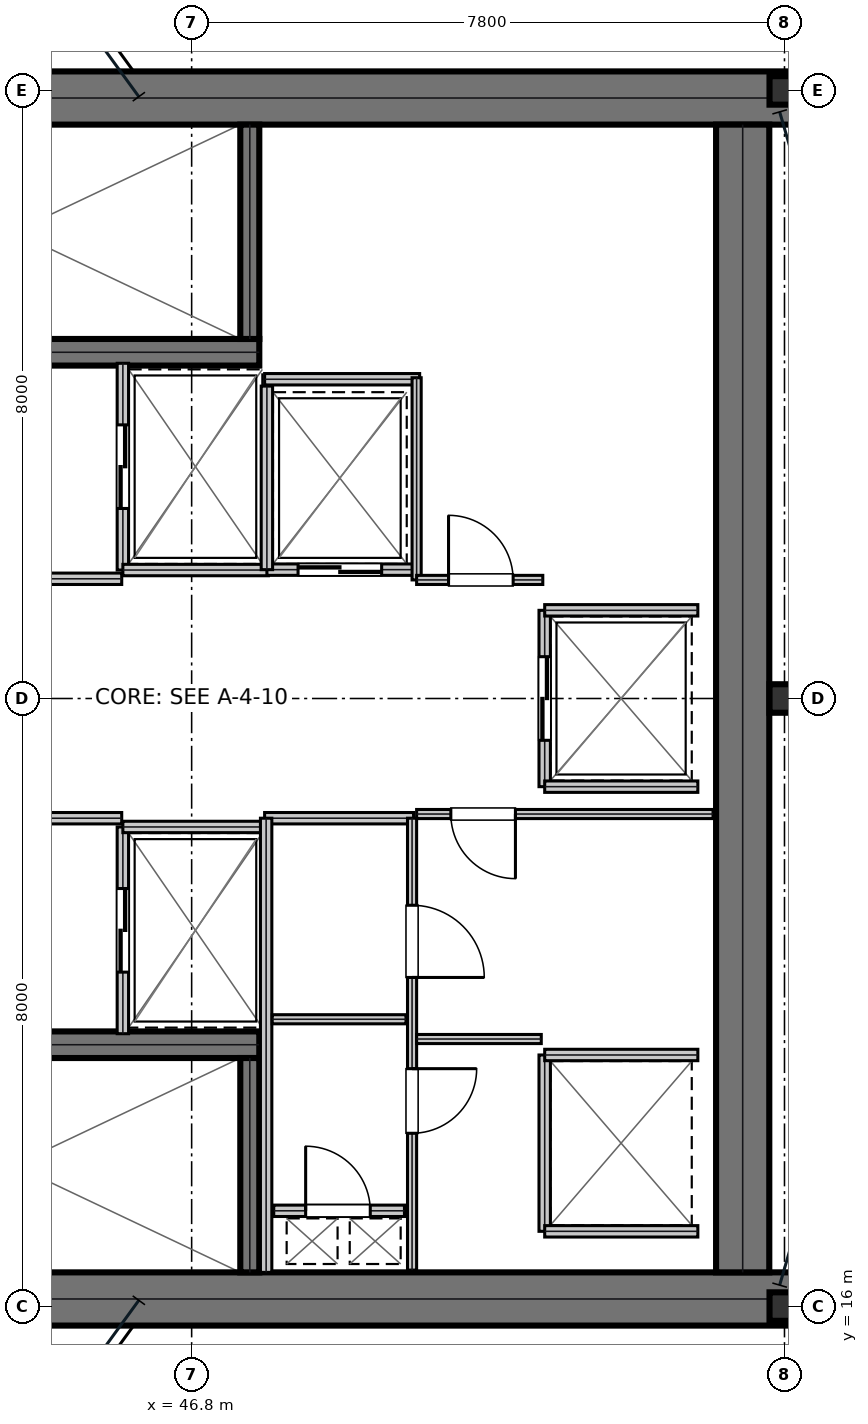
"""IFC4 building model, lengths in metres.
Left out: names, types, materials, properties, quantities, classifications, styles, units other than length and angle.
Written with IfcOpenShell. Run it as: python <this file> out.ifc"""

import sys

from ifc_helpers import new_model, si_unit, direction, frame, frame_2d, origin, origin_2d, place, context, subcontext, project, spatial, rectangle, i_section, extrude, element, fill, save


model = new_model("IFC4")
c1 = context("Model", 3, precision=1e-05, world=origin(), true_north=direction((0.0, 1.0)))
c2 = subcontext(c1, "Body", "Model", "MODEL_VIEW")
j1 = project(units=[si_unit("LENGTHUNIT", "METRE"), si_unit("PLANEANGLEUNIT", "RADIAN")], contexts=[c1])
p1 = place(None, origin())
s1 = spatial("IfcSite", under=j1, at=p1, CompositionType="ELEMENT")
p2 = place(p1, origin())
s2 = spatial("IfcBuilding", under=s1, at=p2, CompositionType="ELEMENT")
p3 = place(p2, frame((0.0, 0.0, 228.3)))
s3 = spatial("IfcBuildingStorey", under=s2, at=p3, CompositionType="ELEMENT", Elevation=228.3)
for number, where, z_axis, x_axis in (
    (1, (38.8, 31.9, 0.0), (0.0, 0.0, 1.0), (1.0, 0.0, 0.0)),
    (2, (38.8, 16.1, 0.0), (0.0, 0.0, 1.0), (1.0, 0.0, 0.0)),
):
    element("IfcWall", number, at=place(p3, frame(where, z_axis=z_axis, x_axis=x_axis)), inside=s3, PredefinedType="SHEAR", context=c2, shape_type="SweptSolid", body=[
        extrude(rectangle(XDim=16.0, YDim=0.7, at=frame_2d((8.0, 0.0))), origin(), (0.0, 0.0, 1.0), 3.79),
    ])
p4 = place(p3, frame((54.05, 16.45, 0.0), z_axis=(0.0, 0.0, 1.0), x_axis=(0.0, 1.0, 0.0)))
e3 = element("IfcWall", 3, at=p4, inside=s3, PredefinedType="SHEAR", context=c2, shape_type="SweptSolid", body=[
    extrude(rectangle(XDim=15.1, YDim=0.7, at=frame_2d((7.55, 0.0))), origin(), (0.0, 0.0, 1.0), 3.79),
])
p5 = place(p3, frame((39.98, 28.555, 0.0), z_axis=(0.0, 0.0, 1.0), x_axis=(1.0, 0.0, 0.0)))
e4 = element("IfcWall", 4, at=p5, inside=s3, PredefinedType="SHEAR", context=c2, shape_type="SweptSolid", body=[
    extrude(rectangle(XDim=7.71, YDim=0.35, at=frame_2d((3.855, 0.0))), origin(), (0.0, 0.0, 1.0), 3.79),
])
p6 = place(p5, frame((0.25, 0.0, 0.0)))
e5 = element("IfcOpeningElement", 5, at=p6, cuts=e4, PredefinedType="OPENING", context=c2, shape_type="SweptSolid", body=[
    extrude(rectangle(XDim=1.1, YDim=2.15, at=frame_2d((0.55, 1.075))), frame((0.0, 0.185, 0.0), z_axis=(0.0, -1.0, 0.0), x_axis=(1.0, 0.0, 0.0)), (0.0, 0.0, 1.0), 0.37),
])
p7 = place(p3, frame((39.98, 19.445, 0.0), z_axis=(0.0, 0.0, 1.0), x_axis=(1.0, 0.0, 0.0)))
e6 = element("IfcWall", 6, at=p7, inside=s3, PredefinedType="SHEAR", context=c2, shape_type="SweptSolid", body=[
    extrude(rectangle(XDim=7.71, YDim=0.35, at=frame_2d((3.855, 0.0))), origin(), (0.0, 0.0, 1.0), 3.79),
])
p8 = place(p7, frame((0.25, 0.0, 0.0)))
e7 = element("IfcOpeningElement", 7, at=p8, cuts=e6, PredefinedType="OPENING", context=c2, shape_type="SweptSolid", body=[
    extrude(rectangle(XDim=1.1, YDim=2.15, at=frame_2d((0.55, 1.075))), frame((0.0, 0.185, 0.0), z_axis=(0.0, -1.0, 0.0), x_axis=(1.0, 0.0, 0.0)), (0.0, 0.0, 1.0), 0.37),
])
for number, where, z_axis, x_axis in (
    (8, (47.565, 28.73, 0.0), (0.0, 0.0, 1.0), (0.0, 1.0, 0.0)),
    (9, (47.565, 16.45, 0.0), (0.0, 0.0, 1.0), (0.0, 1.0, 0.0)),
):
    element("IfcWall", number, at=place(p3, frame(where, z_axis=z_axis, x_axis=x_axis)), inside=s3, PredefinedType="SHEAR", context=c2, shape_type="SweptSolid", body=[
        extrude(rectangle(XDim=2.82, YDim=0.25, at=frame_2d((1.41, 0.0))), origin(), (0.0, 0.0, 1.0), 3.79),
    ])
for number, where, z_axis, x_axis in (
    (10, (54.6, 16.0, 0.0), (0.0, 0.0, 1.0), (1.0, 0.0, 0.0)),
    (11, (54.6, 24.0, 0.0), (0.0, 0.0, 1.0), (1.0, 0.0, 0.0)),
    (12, (54.6, 32.0, 0.0), (0.0, 0.0, 1.0), (1.0, 0.0, 0.0)),
):
    element("IfcColumn", number, at=place(p3, frame(where, z_axis=z_axis, x_axis=x_axis)), inside=s3, PredefinedType="COLUMN", context=c2, shape_type="SweptSolid", body=[
        extrude(i_section(OverallWidth=0.394, OverallDepth=0.375, WebThickness=0.017, FlangeThickness=0.028, at=origin_2d()), origin(), (0.0, 0.0, 1.0), 4.044),
    ])
p9 = place(p3, frame((39.98, 25.575, 0.0), z_axis=(0.0, 0.0, 1.0), x_axis=(1.0, 0.0, 0.0)))
e13 = element("IfcWall", 13, at=p9, inside=s3, PredefinedType="PARTITIONING", context=c2, shape_type="SweptSolid", body=[
    extrude(rectangle(XDim=5.9, YDim=0.15, at=frame_2d((2.95, 0.0))), origin(), (0.0, 0.0, 1.0), 3.79),
])
p10 = place(p9, frame((2.35, 0.0, 0.0)))
e14 = element("IfcOpeningElement", 14, at=p10, cuts=e13, PredefinedType="OPENING", context=c2, shape_type="SweptSolid", body=[
    extrude(rectangle(XDim=1.05, YDim=2.15, at=frame_2d((0.525, 1.075))), frame((0.0, 0.085, 0.0), z_axis=(0.0, -1.0, 0.0), x_axis=(1.0, 0.0, 0.0)), (0.0, 0.0, 1.0), 0.17),
])
p11 = place(p3, frame((39.98, 22.425, 0.0), z_axis=(0.0, 0.0, 1.0), x_axis=(1.0, 0.0, 0.0)))
e15 = element("IfcWall", 15, at=p11, inside=s3, PredefinedType="PARTITIONING", context=c2, shape_type="SweptSolid", body=[
    extrude(rectangle(XDim=5.9, YDim=0.15, at=frame_2d((2.95, 0.0))), origin(), (0.0, 0.0, 1.0), 3.79),
])
p12 = place(p11, frame((2.35, 0.0, 0.0)))
e16 = element("IfcOpeningElement", 16, at=p12, cuts=e15, PredefinedType="OPENING", context=c2, shape_type="SweptSolid", body=[
    extrude(rectangle(XDim=1.05, YDim=2.15, at=frame_2d((0.525, 1.075))), frame((0.0, 0.085, 0.0), z_axis=(0.0, -1.0, 0.0), x_axis=(1.0, 0.0, 0.0)), (0.0, 0.0, 1.0), 0.17),
])
p13 = place(p3, frame((45.895, 25.69, 0.0), z_axis=(0.0, 0.0, 1.0), x_axis=(0.0, 1.0, 0.0)))
e17 = element("IfcWall", 17, at=p13, inside=s3, PredefinedType="PARTITIONING", context=c2, shape_type="SweptSolid", body=[
    extrude(rectangle(XDim=2.72, YDim=0.15, at=frame_2d((1.36, 0.0))), origin(), (0.0, 0.0, 1.0), 3.79),
])
p14 = place(p13, frame((0.81, 0.0, 0.0)))
e18 = element("IfcOpeningElement", 18, at=p14, cuts=e17, PredefinedType="OPENING", context=c2, shape_type="SweptSolid", body=[
    extrude(rectangle(XDim=1.1, YDim=2.15, at=frame_2d((0.55, 1.075))), frame((0.0, 0.085, 0.0), z_axis=(0.0, -1.0, 0.0), x_axis=(1.0, 0.0, 0.0)), (0.0, 0.0, 1.0), 0.17),
])
p15 = place(p3, frame((45.895, 25.69, 0.0), z_axis=(0.0, 0.0, 1.0), x_axis=(1.0, 0.0, 0.0)))
e19 = element("IfcWall", 19, at=p15, inside=s3, PredefinedType="PARTITIONING", context=c2, shape_type="SweptSolid", body=[
    extrude(rectangle(XDim=1.915, YDim=0.15, at=frame_2d((0.958, 0.0))), origin(), (0.0, 0.0, 1.0), 3.79),
])
p16 = place(p3, frame((45.895, 19.59, 0.0), z_axis=(0.0, 0.0, 1.0), x_axis=(0.0, 1.0, 0.0)))
e20 = element("IfcWall", 20, at=p16, inside=s3, PredefinedType="PARTITIONING", context=c2, shape_type="SweptSolid", body=[
    extrude(rectangle(XDim=2.72, YDim=0.15, at=frame_2d((1.36, 0.0))), origin(), (0.0, 0.0, 1.0), 3.79),
])
p17 = place(p16, frame((0.81, 0.0, 0.0)))
e21 = element("IfcOpeningElement", 21, at=p17, cuts=e20, PredefinedType="OPENING", context=c2, shape_type="SweptSolid", body=[
    extrude(rectangle(XDim=1.1, YDim=2.15, at=frame_2d((0.55, 1.075))), frame((0.0, 0.085, 0.0), z_axis=(0.0, -1.0, 0.0), x_axis=(1.0, 0.0, 0.0)), (0.0, 0.0, 1.0), 0.17),
])
p18 = place(p3, frame((45.895, 22.31, 0.0), z_axis=(0.0, 0.0, 1.0), x_axis=(1.0, 0.0, 0.0)))
e22 = element("IfcWall", 22, at=p18, inside=s3, PredefinedType="PARTITIONING", context=c2, shape_type="SweptSolid", body=[
    extrude(rectangle(XDim=1.915, YDim=0.15, at=frame_2d((0.958, 0.0))), origin(), (0.0, 0.0, 1.0), 3.79),
])
p19 = place(p3, frame((47.79, 25.695, 0.0), z_axis=(0.0, 0.0, 1.0), x_axis=(1.0, 0.0, 0.0)))
e23 = element("IfcWall", 23, at=p19, inside=s3, PredefinedType="PARTITIONING", context=c2, shape_type="SweptSolid", body=[
    extrude(rectangle(XDim=1.92, YDim=0.15, at=frame_2d((0.96, 0.0))), origin(), (0.0, 0.0, 1.0), 3.79),
])
p20 = place(p19, frame((0.41, 0.0, 0.0)))
e24 = element("IfcOpeningElement", 24, at=p20, cuts=e23, PredefinedType="OPENING", context=c2, shape_type="SweptSolid", body=[
    extrude(rectangle(XDim=1.1, YDim=2.15, at=frame_2d((0.55, 1.075))), frame((0.0, 0.085, 0.0), z_axis=(0.0, -1.0, 0.0), x_axis=(1.0, 0.0, 0.0)), (0.0, 0.0, 1.0), 0.17),
])
p21 = place(p3, frame((47.79, 25.695, 0.0), z_axis=(0.0, 0.0, 1.0), x_axis=(0.0, 1.0, 0.0)))
e25 = element("IfcWall", 25, at=p21, inside=s3, PredefinedType="PARTITIONING", context=c2, shape_type="SweptSolid", body=[
    extrude(rectangle(XDim=2.415, YDim=0.15, at=frame_2d((1.208, 0.0))), origin(), (0.0, 0.0, 1.0), 3.79),
])
p22 = place(p3, frame((51.445, 22.84, 0.0), z_axis=(0.0, 0.0, 1.0), x_axis=(0.0, 1.0, 0.0)))
e26 = element("IfcWall", 26, at=p22, inside=s3, PredefinedType="PARTITIONING", context=c2, shape_type="SweptSolid", body=[
    extrude(rectangle(XDim=2.32, YDim=0.15, at=frame_2d((1.16, 0.0))), origin(), (0.0, 0.0, 1.0), 3.79),
])
p23 = place(p22, frame((0.61, 0.0, 0.0)))
e27 = element("IfcOpeningElement", 27, at=p23, cuts=e26, PredefinedType="OPENING", context=c2, shape_type="SweptSolid", body=[
    extrude(rectangle(XDim=1.1, YDim=2.15, at=frame_2d((0.55, 1.075))), frame((0.0, 0.085, 0.0), z_axis=(0.0, -1.0, 0.0), x_axis=(1.0, 0.0, 0.0)), (0.0, 0.0, 1.0), 0.17),
])
for number, where, z_axis, x_axis in (
    (28, (51.445, 22.84, 0.0), (0.0, 0.0, 1.0), (1.0, 0.0, 0.0)),
    (29, (51.445, 25.16, 0.0), (0.0, 0.0, 1.0), (1.0, 0.0, 0.0)),
):
    element("IfcWall", number, at=place(p3, frame(where, z_axis=z_axis, x_axis=x_axis)), inside=s3, PredefinedType="PARTITIONING", context=c2, shape_type="SweptSolid", body=[
        extrude(rectangle(XDim=2.015, YDim=0.15, at=frame_2d((1.007, 0.0))), origin(), (0.0, 0.0, 1.0), 3.79),
    ])
p24 = place(p3, frame((51.445, 16.99, 0.0), z_axis=(0.0, 0.0, 1.0), x_axis=(0.0, 1.0, 0.0)))
e30 = element("IfcWall", 30, at=p24, inside=s3, PredefinedType="PARTITIONING", context=c2, shape_type="SweptSolid", body=[
    extrude(rectangle(XDim=2.32, YDim=0.15, at=frame_2d((1.16, 0.0))), origin(), (0.0, 0.0, 1.0), 3.79),
])
for number, where, z_axis, x_axis in (
    (31, (51.445, 16.99, 0.0), (0.0, 0.0, 1.0), (1.0, 0.0, 0.0)),
    (32, (51.445, 19.31, 0.0), (0.0, 0.0, 1.0), (1.0, 0.0, 0.0)),
):
    element("IfcWall", number, at=place(p3, frame(where, z_axis=z_axis, x_axis=x_axis)), inside=s3, PredefinedType="PARTITIONING", context=c2, shape_type="SweptSolid", body=[
        extrude(rectangle(XDim=2.015, YDim=0.15, at=frame_2d((1.007, 0.0))), origin(), (0.0, 0.0, 1.0), 3.79),
    ])
p25 = place(p3, frame((47.88, 17.26, 0.0), z_axis=(0.0, 0.0, 1.0), x_axis=(1.0, 0.0, 0.0)))
e33 = element("IfcWall", 33, at=p25, inside=s3, PredefinedType="PARTITIONING", context=c2, shape_type="SweptSolid", body=[
    extrude(rectangle(XDim=1.72, YDim=0.15, at=frame_2d((0.86, 0.0))), origin(), (0.0, 0.0, 1.0), 3.79),
])
p26 = place(p25, frame((0.42, 0.0, 0.0)))
e34 = element("IfcOpeningElement", 34, at=p26, cuts=e33, PredefinedType="OPENING", context=c2, shape_type="SweptSolid", body=[
    extrude(rectangle(XDim=0.85, YDim=2.15, at=frame_2d((0.425, 1.075))), frame((0.0, 0.085, 0.0), z_axis=(0.0, -1.0, 0.0), x_axis=(1.0, 0.0, 0.0)), (0.0, 0.0, 1.0), 0.17),
])
p27 = place(p3, frame((47.76, 22.425, 0.0), z_axis=(0.0, 0.0, 1.0), x_axis=(1.0, 0.0, 0.0)))
e35 = element("IfcWall", 35, at=p27, inside=s3, PredefinedType="PARTITIONING", context=c2, shape_type="SweptSolid", body=[
    extrude(rectangle(XDim=1.96, YDim=0.15, at=frame_2d((0.98, 0.0))), origin(), (0.0, 0.0, 1.0), 3.79),
])
p28 = place(p3, frame((47.78, 16.45, 0.0), z_axis=(0.0, 0.0, 1.0), x_axis=(0.0, 1.0, 0.0)))
e36 = element("IfcWall", 36, at=p28, inside=s3, PredefinedType="PARTITIONING", context=c2, shape_type="SweptSolid", body=[
    extrude(rectangle(XDim=5.975, YDim=0.15, at=frame_2d((2.988, 0.0))), origin(), (0.0, 0.0, 1.0), 3.79),
])
p29 = place(p3, frame((47.86, 19.78, 0.0), z_axis=(0.0, 0.0, 1.0), x_axis=(1.0, 0.0, 0.0)))
e37 = element("IfcWall", 37, at=p29, inside=s3, PredefinedType="PARTITIONING", context=c2, shape_type="SweptSolid", body=[
    extrude(rectangle(XDim=1.76, YDim=0.12, at=frame_2d((0.88, 0.0))), origin(), (0.0, 0.0, 1.0), 3.79),
])
p30 = place(p3, frame((49.7, 16.48, 0.0), z_axis=(0.0, 0.0, 1.0), x_axis=(0.0, 1.0, 0.0)))
e38 = element("IfcWall", 38, at=p30, inside=s3, PredefinedType="PARTITIONING", context=c2, shape_type="SweptSolid", body=[
    extrude(rectangle(XDim=5.945, YDim=0.12, at=frame_2d((2.973, 0.0))), origin(), (0.0, 0.0, 1.0), 3.79),
])
p31 = place(p30, frame((1.8, 0.0, 0.0)))
e39 = element("IfcOpeningElement", 39, at=p31, cuts=e38, PredefinedType="OPENING", context=c2, shape_type="SweptSolid", body=[
    extrude(rectangle(XDim=0.85, YDim=2.15, at=frame_2d((0.425, 1.075))), frame((0.0, 0.07, 0.0), z_axis=(0.0, -1.0, 0.0), x_axis=(1.0, 0.0, 0.0)), (0.0, 0.0, 1.0), 0.14),
])
p32 = place(p30, frame((3.85, 0.0, 0.0)))
e40 = element("IfcOpeningElement", 40, at=p32, cuts=e38, PredefinedType="OPENING", context=c2, shape_type="SweptSolid", body=[
    extrude(rectangle(XDim=0.95, YDim=2.15, at=frame_2d((0.475, 1.075))), frame((0.0, 0.07, 0.0), z_axis=(0.0, -1.0, 0.0), x_axis=(1.0, 0.0, 0.0)), (0.0, 0.0, 1.0), 0.14),
])
p33 = place(p3, frame((49.76, 22.48, 0.0), z_axis=(0.0, 0.0, 1.0), x_axis=(1.0, 0.0, 0.0)))
e41 = element("IfcWall", 41, at=p33, inside=s3, PredefinedType="PARTITIONING", context=c2, shape_type="SweptSolid", body=[
    extrude(rectangle(XDim=3.9, YDim=0.12, at=frame_2d((1.95, 0.0))), origin(), (0.0, 0.0, 1.0), 3.79),
])
p34 = place(p33, frame((0.45, 0.0, 0.0)))
e42 = element("IfcOpeningElement", 42, at=p34, cuts=e41, PredefinedType="OPENING", context=c2, shape_type="SweptSolid", body=[
    extrude(rectangle(XDim=0.85, YDim=2.15, at=frame_2d((0.425, 1.075))), frame((0.0, 0.07, 0.0), z_axis=(0.0, -1.0, 0.0), x_axis=(1.0, 0.0, 0.0)), (0.0, 0.0, 1.0), 0.14),
])
p35 = place(p3, frame((49.76, 19.52, 0.0), z_axis=(0.0, 0.0, 1.0), x_axis=(1.0, 0.0, 0.0)))
e43 = element("IfcWall", 43, at=p35, inside=s3, PredefinedType="PARTITIONING", context=c2, shape_type="SweptSolid", body=[
    extrude(rectangle(XDim=1.64, YDim=0.12, at=frame_2d((0.82, 0.0))), origin(), (0.0, 0.0, 1.0), 3.79),
])
p36 = place(p3, frame((47.76, 28.2, 0.0), z_axis=(0.0, 0.0, 1.0), x_axis=(1.0, 0.0, 0.0)))
e44 = element("IfcWall", 44, at=p36, inside=s3, PredefinedType="PARTITIONING", context=c2, shape_type="SweptSolid", body=[
    extrude(rectangle(XDim=2.04, YDim=0.15, at=frame_2d((1.02, 0.0))), origin(), (0.0, 0.0, 1.0), 3.79),
])
p37 = place(p3, frame((49.76, 25.56, 0.0), z_axis=(0.0, 0.0, 1.0), x_axis=(0.0, 1.0, 0.0)))
e45 = element("IfcWall", 45, at=p37, inside=s3, PredefinedType="PARTITIONING", context=c2, shape_type="SweptSolid", body=[
    extrude(rectangle(XDim=2.66, YDim=0.12, at=frame_2d((1.33, 0.0))), origin(), (0.0, 0.0, 1.0), 3.79),
])
p38 = place(p3, frame((49.76, 25.56, 0.0), z_axis=(0.0, 0.0, 1.0), x_axis=(1.0, 0.0, 0.0)))
e46 = element("IfcWall", 46, at=p38, inside=s3, PredefinedType="PARTITIONING", context=c2, shape_type="SweptSolid", body=[
    extrude(rectangle(XDim=1.66, YDim=0.12, at=frame_2d((0.83, 0.0))), origin(), (0.0, 0.0, 1.0), 3.79),
])
p39 = place(p38, frame((0.42, 0.0, 0.0)))
e47 = element("IfcOpeningElement", 47, at=p39, cuts=e46, PredefinedType="OPENING", context=c2, shape_type="SweptSolid", body=[
    extrude(rectangle(XDim=0.85, YDim=2.15, at=frame_2d((0.425, 1.075))), frame((0.0, 0.07, 0.0), z_axis=(0.0, -1.0, 0.0), x_axis=(1.0, 0.0, 0.0)), (0.0, 0.0, 1.0), 0.14),
])
p40 = place(p14, frame((1.1, 0.0, 0.0), z_axis=(0.0, 0.0, 1.0), x_axis=(-1.0, 0.0, 0.0)))
e48 = element("IfcDoor", 48, at=p40, inside=s3, OperationType="DOUBLE_DOOR_SLIDING", PredefinedType="DOOR", context=c2, shape_type="SweptSolid", body=[
    extrude(rectangle(XDim=1.1, YDim=2.15, at=frame_2d((0.55, 1.075))), frame((0.0, 0.025, 0.0), z_axis=(0.0, -1.0, 0.0), x_axis=(1.0, 0.0, 0.0)), (0.0, 0.0, 1.0), 0.05),
])
fill(e18, e48)
p41 = place(p17, frame((1.1, 0.0, 0.0), z_axis=(0.0, 0.0, 1.0), x_axis=(-1.0, 0.0, 0.0)))
e49 = element("IfcDoor", 49, at=p41, inside=s3, OperationType="DOUBLE_DOOR_SLIDING", PredefinedType="DOOR", context=c2, shape_type="SweptSolid", body=[
    extrude(rectangle(XDim=1.1, YDim=2.15, at=frame_2d((0.55, 1.075))), frame((0.0, 0.025, 0.0), z_axis=(0.0, -1.0, 0.0), x_axis=(1.0, 0.0, 0.0)), (0.0, 0.0, 1.0), 0.05),
])
fill(e21, e49)
p42 = place(p20, frame((1.1, 0.0, 0.0), z_axis=(0.0, 0.0, 1.0), x_axis=(-1.0, 0.0, 0.0)))
e50 = element("IfcDoor", 50, at=p42, inside=s3, OperationType="DOUBLE_DOOR_SLIDING", PredefinedType="DOOR", context=c2, shape_type="SweptSolid", body=[
    extrude(rectangle(XDim=1.1, YDim=2.15, at=frame_2d((0.55, 1.075))), frame((0.0, 0.025, 0.0), z_axis=(0.0, -1.0, 0.0), x_axis=(1.0, 0.0, 0.0)), (0.0, 0.0, 1.0), 0.05),
])
fill(e24, e50)
p43 = place(p23, frame((1.1, 0.0, 0.0), z_axis=(0.0, 0.0, 1.0), x_axis=(-1.0, 0.0, 0.0)))
e51 = element("IfcDoor", 51, at=p43, inside=s3, OperationType="DOUBLE_DOOR_SLIDING", PredefinedType="DOOR", context=c2, shape_type="SweptSolid", body=[
    extrude(rectangle(XDim=1.1, YDim=2.15, at=frame_2d((0.55, 1.075))), frame((0.0, 0.025, 0.0), z_axis=(0.0, -1.0, 0.0), x_axis=(1.0, 0.0, 0.0)), (0.0, 0.0, 1.0), 0.05),
])
fill(e27, e51)
p44 = place(p26, origin())
e52 = element("IfcDoor", 52, at=p44, inside=s3, OperationType="SINGLE_SWING_LEFT", PredefinedType="TRAPDOOR", context=c2, shape_type="SweptSolid", body=[
    extrude(rectangle(XDim=0.85, YDim=2.15, at=frame_2d((0.425, 1.075))), frame((0.0, 0.025, 0.0), z_axis=(0.0, -1.0, 0.0), x_axis=(1.0, 0.0, 0.0)), (0.0, 0.0, 1.0), 0.05),
])
fill(e34, e52)
p45 = place(p31, frame((0.85, 0.0, 0.0), z_axis=(0.0, 0.0, 1.0), x_axis=(-1.0, 0.0, 0.0)))
e53 = element("IfcDoor", 53, at=p45, inside=s3, OperationType="SINGLE_SWING_LEFT", PredefinedType="DOOR", context=c2, shape_type="SweptSolid", body=[
    extrude(rectangle(XDim=0.85, YDim=2.15, at=frame_2d((0.425, 1.075))), frame((0.0, 0.025, 0.0), z_axis=(0.0, -1.0, 0.0), x_axis=(1.0, 0.0, 0.0)), (0.0, 0.0, 1.0), 0.05),
])
fill(e39, e53)
p46 = place(p32, frame((0.95, 0.0, 0.0), z_axis=(0.0, 0.0, 1.0), x_axis=(-1.0, 0.0, 0.0)))
e54 = element("IfcDoor", 54, at=p46, inside=s3, OperationType="SINGLE_SWING_RIGHT", PredefinedType="DOOR", context=c2, shape_type="SweptSolid", body=[
    extrude(rectangle(XDim=0.95, YDim=2.15, at=frame_2d((0.475, 1.075))), frame((0.0, 0.025, 0.0), z_axis=(0.0, -1.0, 0.0), x_axis=(1.0, 0.0, 0.0)), (0.0, 0.0, 1.0), 0.05),
])
fill(e40, e54)
p47 = place(p34, frame((0.85, 0.0, 0.0), z_axis=(0.0, 0.0, 1.0), x_axis=(-1.0, 0.0, 0.0)))
e55 = element("IfcDoor", 55, at=p47, inside=s3, OperationType="SINGLE_SWING_LEFT", PredefinedType="DOOR", context=c2, shape_type="SweptSolid", body=[
    extrude(rectangle(XDim=0.85, YDim=2.15, at=frame_2d((0.425, 1.075))), frame((0.0, 0.025, 0.0), z_axis=(0.0, -1.0, 0.0), x_axis=(1.0, 0.0, 0.0)), (0.0, 0.0, 1.0), 0.05),
])
fill(e42, e55)
p48 = place(p39, origin())
e56 = element("IfcDoor", 56, at=p48, inside=s3, OperationType="SINGLE_SWING_LEFT", PredefinedType="DOOR", context=c2, shape_type="SweptSolid", body=[
    extrude(rectangle(XDim=0.85, YDim=2.15, at=frame_2d((0.425, 1.075))), frame((0.0, 0.025, 0.0), z_axis=(0.0, -1.0, 0.0), x_axis=(1.0, 0.0, 0.0)), (0.0, 0.0, 1.0), 0.05),
])
fill(e47, e56)
save(model, sys.argv[1])
